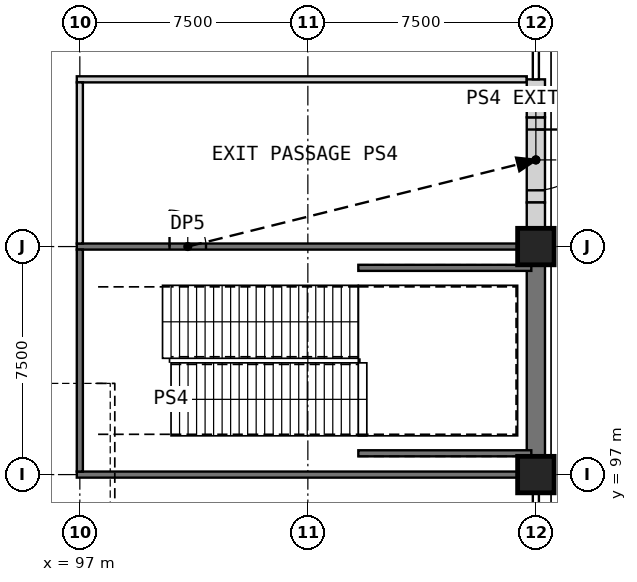
"""IFC4 building model, lengths in metres.
Left out: names, types, materials, properties, quantities, classifications, styles, units other than length and angle.
Written with IfcOpenShell. Run it as: python <this file> out.ifc"""

import sys

from ifc_helpers import new_model, si_unit, direction, frame, frame_2d, origin, origin_2d, place, context, subcontext, project, spatial, rectangle, extrude, element, fill, save


model = new_model("IFC4")
c1 = context("Model", 3, precision=1e-05, world=origin(), true_north=direction((0.0, 1.0)))
c2 = subcontext(c1, "Body", "Model", "MODEL_VIEW")
j1 = project(units=[si_unit("LENGTHUNIT", "METRE"), si_unit("PLANEANGLEUNIT", "RADIAN")], contexts=[c1])
p1 = place(None, origin())
s1 = spatial("IfcSite", under=j1, at=p1, CompositionType="ELEMENT")
p2 = place(p1, origin())
s2 = spatial("IfcBuilding", under=s1, at=p2, CompositionType="ELEMENT")
p3 = place(p2, origin())
s3 = spatial("IfcBuildingStorey", under=s2, at=p3, CompositionType="ELEMENT", Elevation=0.0)
for number, where, z_axis, x_axis in (
    (1, (112.0, 97.0, 0.0), (0.0, 0.0, 1.0), (1.0, 0.0, 0.0)),
    (2, (112.0, 104.5, 0.0), (0.0, 0.0, 1.0), (1.0, 0.0, 0.0)),
):
    element("IfcColumn", number, at=place(p3, frame(where, z_axis=z_axis, x_axis=x_axis)), inside=s3, PredefinedType="COLUMN", context=c2, shape_type="SweptSolid", body=[
        extrude(rectangle(XDim=1.2, YDim=1.2, at=origin_2d()), origin(), (0.0, 0.0, 1.0), 8.0),
    ])
p4 = place(p3, frame((96.9, 97.0, 0.0), z_axis=(0.0, 0.0, 1.0), x_axis=(1.0, 0.0, 0.0)))
e3 = element("IfcWall", 3, at=p4, inside=s3, PredefinedType="SHEAR", context=c2, shape_type="SweptSolid", body=[
    extrude(rectangle(XDim=14.5, YDim=0.2, at=frame_2d((7.25, 0.0))), origin(), (0.0, 0.0, 1.0), 5.5),
])
p5 = place(p3, frame((96.9, 104.5, 0.0), z_axis=(0.0, 0.0, 1.0), x_axis=(1.0, 0.0, 0.0)))
e4 = element("IfcWall", 4, at=p5, inside=s3, PredefinedType="SHEAR", context=c2, shape_type="SweptSolid", body=[
    extrude(rectangle(XDim=14.5, YDim=0.2, at=frame_2d((7.25, 0.0))), origin(), (0.0, 0.0, 1.0), 5.5),
])
p6 = place(p5, frame((3.05, 0.0, 0.0)))
e5 = element("IfcOpeningElement", 5, at=p6, cuts=e4, PredefinedType="OPENING", context=c2, shape_type="SweptSolid", body=[
    extrude(rectangle(XDim=1.2, YDim=2.1, at=frame_2d((0.6, 1.05))), frame((0.0, 0.11, 0.0), z_axis=(0.0, -1.0, 0.0), x_axis=(1.0, 0.0, 0.0)), (0.0, 0.0, 1.0), 0.22),
])
p7 = place(p3, frame((96.9, 110.0, 0.0), z_axis=(0.0, 0.0, 1.0), x_axis=(1.0, 0.0, 0.0)))
e6 = element("IfcWall", 6, at=p7, inside=s3, PredefinedType="PARTITIONING", context=c2, shape_type="SweptSolid", body=[
    extrude(rectangle(XDim=14.8, YDim=0.2, at=frame_2d((7.4, 0.0))), origin(), (0.0, 0.0, 1.0), 7.7),
])
p8 = place(p3, frame((112.0, 97.6, 0.0), z_axis=(0.0, 0.0, 1.0), x_axis=(0.0, 1.0, 0.0)))
e7 = element("IfcWall", 7, at=p8, inside=s3, PredefinedType="PARTITIONING", context=c2, shape_type="SweptSolid", body=[
    extrude(rectangle(XDim=6.3, YDim=0.6, at=frame_2d((3.15, 0.0))), origin(), (0.0, 0.0, 1.0), 7.1),
])
p9 = place(p3, frame((112.0, 108.75, 0.0), z_axis=(0.0, 0.0, 1.0), x_axis=(0.0, -1.0, 0.0)))
e8 = element("IfcWall", 8, at=p9, inside=s3, PredefinedType="PARTITIONING", context=c2, shape_type="SweptSolid", body=[
    extrude(rectangle(XDim=2.8, YDim=0.6, at=frame_2d((1.4, 0.0))), origin(), (0.0, 0.0, 1.0), 7.1),
])
p10 = place(p9, frame((0.4, 0.0, 0.0)))
e9 = element("IfcOpeningElement", 9, at=p10, cuts=e8, PredefinedType="OPENING", context=c2, shape_type="SweptSolid", body=[
    extrude(rectangle(XDim=2.0, YDim=2.4, at=frame_2d((1.0, 1.2))), frame((0.0, 0.31, 0.0), z_axis=(0.0, -1.0, 0.0), x_axis=(1.0, 0.0, 0.0)), (0.0, 0.0, 1.0), 0.62),
])
p11 = place(p3, frame((112.0, 105.1, 0.0), z_axis=(0.0, 0.0, 1.0), x_axis=(0.0, 1.0, 0.0)))
e10 = element("IfcWall", 10, at=p11, inside=s3, PredefinedType="PARTITIONING", context=c2, shape_type="SweptSolid", body=[
    extrude(rectangle(XDim=0.85, YDim=0.6, at=frame_2d((0.425, 0.0))), origin(), (0.0, 0.0, 1.0), 7.1),
])
p12 = place(p3, frame((112.0, 108.75, 0.0), z_axis=(0.0, 0.0, 1.0), x_axis=(0.0, 1.0, 0.0)))
e11 = element("IfcWall", 11, at=p12, inside=s3, PredefinedType="PARTITIONING", context=c2, shape_type="SweptSolid", body=[
    extrude(rectangle(XDim=1.25, YDim=0.6, at=frame_2d((0.625, 0.0))), origin(), (0.0, 0.0, 1.0), 7.1),
])
p13 = place(p3, frame((97.0, 97.1, 0.0), z_axis=(0.0, 0.0, 1.0), x_axis=(0.0, 1.0, 0.0)))
e12 = element("IfcWall", 12, at=p13, inside=s3, PredefinedType="SHEAR", context=c2, shape_type="SweptSolid", body=[
    extrude(rectangle(XDim=7.3, YDim=0.2, at=frame_2d((3.65, 0.0))), origin(), (0.0, 0.0, 1.0), 5.5),
])
p14 = place(p3, frame((97.0, 104.6, 0.0), z_axis=(0.0, 0.0, 1.0), x_axis=(0.0, 1.0, 0.0)))
e13 = element("IfcWall", 13, at=p14, inside=s3, PredefinedType="PARTITIONING", context=c2, shape_type="SweptSolid", body=[
    extrude(rectangle(XDim=5.3, YDim=0.2, at=frame_2d((2.65, 0.0))), origin(), (0.0, 0.0, 1.0), 5.5),
])
for number, where, z_axis, x_axis in (
    (14, (106.16, 97.7, 0.0), (0.0, 0.0, 1.0), (1.0, 0.0, 0.0)),
    (15, (106.16, 103.8, 0.0), (0.0, 0.0, 1.0), (1.0, 0.0, 0.0)),
):
    element("IfcWall", number, at=place(p3, frame(where, z_axis=z_axis, x_axis=x_axis)), inside=s3, PredefinedType="SHEAR", context=c2, shape_type="SweptSolid", body=[
        extrude(rectangle(XDim=5.69, YDim=0.2, at=frame_2d((2.845, 0.0))), origin(), (0.0, 0.0, 1.0), 3.8),
    ])
p15 = place(p6, origin())
e16 = element("IfcDoor", 16, at=p15, inside=s3, OperationType="SINGLE_SWING_LEFT", PredefinedType="DOOR", context=c2, shape_type="SweptSolid", body=[
    extrude(rectangle(XDim=1.2, YDim=2.1, at=frame_2d((0.6, 1.05))), frame((0.0, 0.025, 0.0), z_axis=(0.0, -1.0, 0.0), x_axis=(1.0, 0.0, 0.0)), (0.0, 0.0, 1.0), 0.05),
])
fill(e5, e16)
p16 = place(p10, origin())
e17 = element("IfcDoor", 17, at=p16, inside=s3, OperationType="SINGLE_SWING_LEFT", PredefinedType="DOOR", context=c2, shape_type="SweptSolid", body=[
    extrude(rectangle(XDim=2.0, YDim=2.4, at=frame_2d((1.0, 1.2))), frame((0.0, 0.025, 0.0), z_axis=(0.0, -1.0, 0.0), x_axis=(1.0, 0.0, 0.0)), (0.0, 0.0, 1.0), 0.05),
])
fill(e9, e17)
save(model, sys.argv[1])
